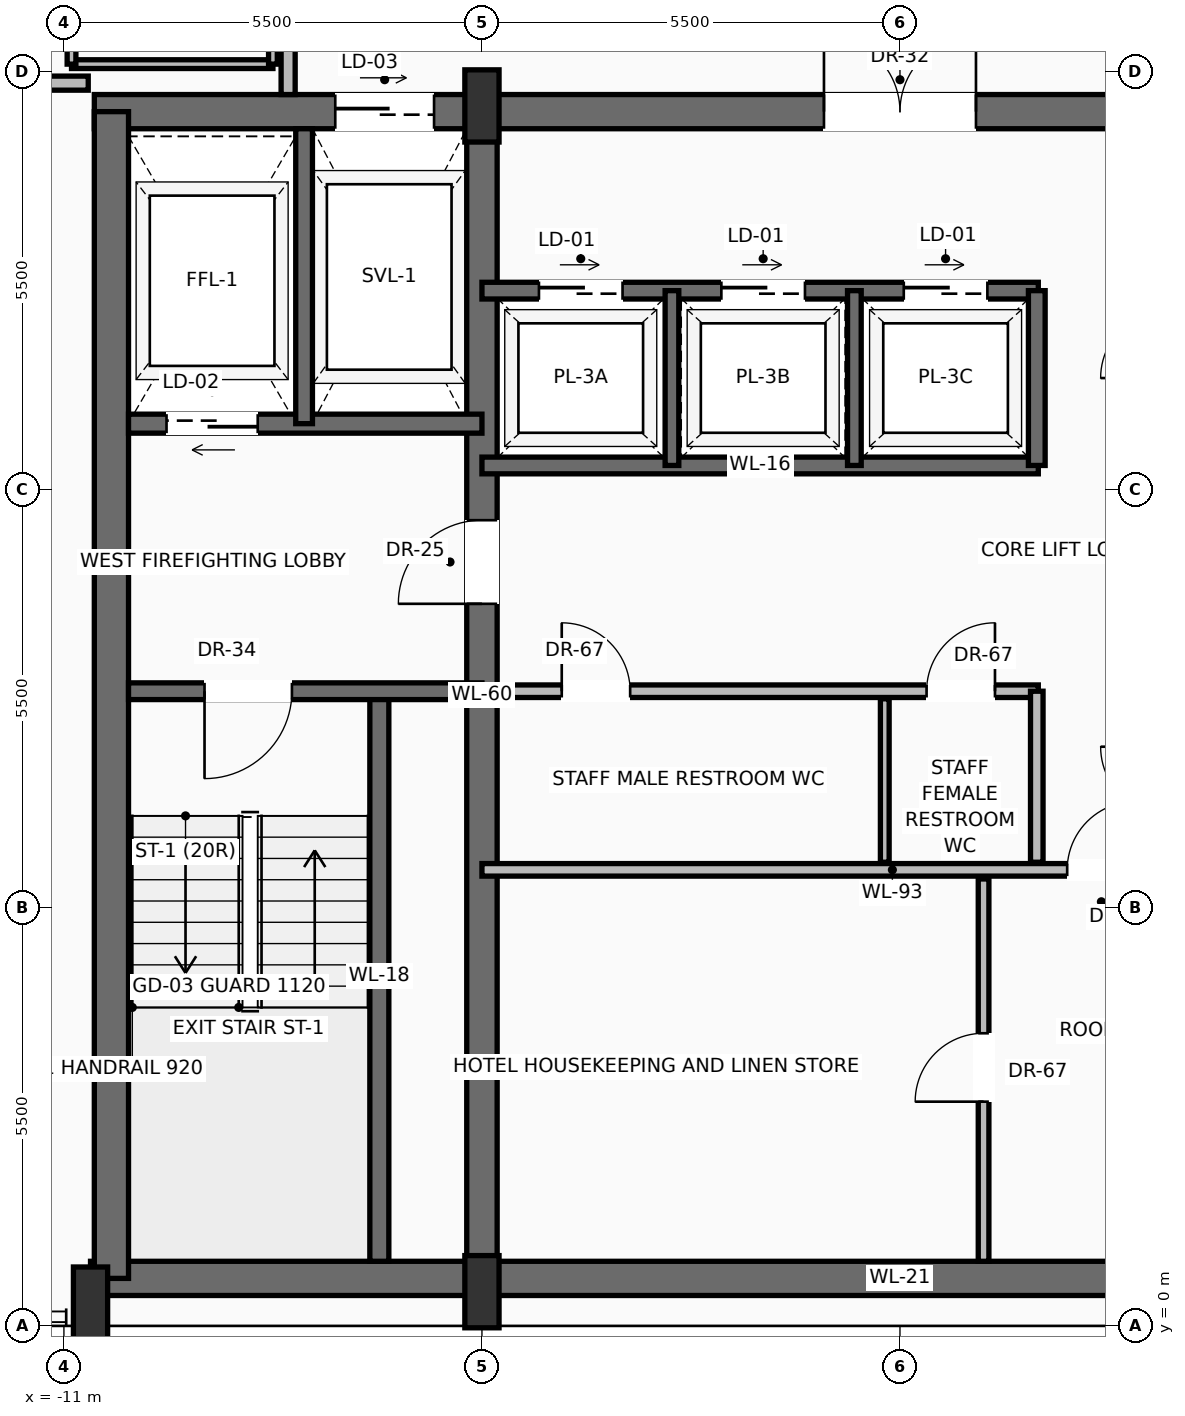
"""IFC4 building model, lengths in metres.
Left out: names, types, materials, properties, quantities, classifications, styles, units other than length and angle.
Written with IfcOpenShell. Run it as: python <this file> out.ifc"""

import sys

from ifc_helpers import new_model, si_unit, direction, frame, frame_2d, origin, origin_2d, place, context, subcontext, project, spatial, rectangle, extrude, source, transform, mapped, element, fill, save


model = new_model("IFC4")
c1 = context("Model", 3, precision=1e-05, world=origin(), true_north=direction((0.0, 1.0)))
c2 = subcontext(c1, "Body", "Model", "MODEL_VIEW")
j1 = project(units=[si_unit("LENGTHUNIT", "METRE"), si_unit("PLANEANGLEUNIT", "RADIAN")], contexts=[c1])
p1 = place(None, origin())
s1 = spatial("IfcSite", under=j1, at=p1, CompositionType="ELEMENT")
p2 = place(p1, origin())
s2 = spatial("IfcBuilding", under=s1, at=p2, CompositionType="ELEMENT")
p3 = place(p2, frame((0.0, 0.0, 279.9)))
s3 = spatial("IfcBuildingStorey", under=s2, at=p3, CompositionType="ELEMENT", Elevation=279.9)
p4 = place(p3, frame((-10.65, 0.625, 0.0), z_axis=(0.0, 0.0, 1.0), x_axis=(1.0, 0.0, 0.0)))
e1 = element("IfcWall", 1, at=p4, inside=s3, PredefinedType="SHEAR", context=c2, shape_type="SweptSolid", body=[
    extrude(rectangle(XDim=21.3, YDim=0.45, at=frame_2d((10.65, 0.0))), origin(), (0.0, 0.0, 1.0), 3.24),
])
p5 = place(p3, frame((-10.6, 15.975, 0.0), z_axis=(0.0, 0.0, 1.0), x_axis=(1.0, 0.0, 0.0)))
e2 = element("IfcWall", 2, at=p5, inside=s3, PredefinedType="SHEAR", context=c2, shape_type="SweptSolid", body=[
    extrude(rectangle(XDim=21.2, YDim=0.45, at=frame_2d((10.6, 0.0))), origin(), (0.0, 0.0, 1.0), 3.24),
])
p6 = place(p5, frame((3.17, 0.0, 0.0)))
e3 = element("IfcOpeningElement", 3, at=p6, cuts=e2, PredefinedType="OPENING", context=c2, shape_type="SweptSolid", body=[
    extrude(rectangle(XDim=1.3, YDim=2.3, at=frame_2d((0.65, 1.15))), frame((0.0, 0.235, 0.0), z_axis=(0.0, -1.0, 0.0), x_axis=(1.0, 0.0, 0.0)), (0.0, 0.0, 1.0), 0.47),
])
p7 = place(p5, frame((9.6, 0.0, 0.0)))
e4 = element("IfcOpeningElement", 4, at=p7, cuts=e2, PredefinedType="OPENING", context=c2, shape_type="SweptSolid", body=[
    extrude(rectangle(XDim=2.0, YDim=2.4, at=frame_2d((1.0, 1.2))), frame((0.0, 0.235, 0.0), z_axis=(0.0, -1.0, 0.0), x_axis=(1.0, 0.0, 0.0)), (0.0, 0.0, 1.0), 0.47),
])
p8 = place(p3, frame((-10.375, 0.625, 0.0), z_axis=(0.0, 0.0, 1.0), x_axis=(0.0, 1.0, 0.0)))
e5 = element("IfcWall", 5, at=p8, inside=s3, PredefinedType="SHEAR", context=c2, shape_type="SweptSolid", body=[
    extrude(rectangle(XDim=15.35, YDim=0.45, at=frame_2d((7.675, 0.0))), origin(), (0.0, 0.0, 1.0), 3.24),
])
p9 = place(p3, frame((-5.5, 0.625, 0.0), z_axis=(0.0, 0.0, 1.0), x_axis=(0.0, 1.0, 0.0)))
e6 = element("IfcWall", 6, at=p9, inside=s3, PredefinedType="SHEAR", context=c2, shape_type="SweptSolid", body=[
    extrude(rectangle(XDim=15.35, YDim=0.4, at=frame_2d((7.675, 0.0))), origin(), (0.0, 0.0, 1.0), 3.24),
])
p10 = place(p9, frame((8.875, 0.0, 0.0)))
e7 = element("IfcOpeningElement", 7, at=p10, cuts=e6, PredefinedType="OPENING", context=c2, shape_type="SweptSolid", body=[
    extrude(rectangle(XDim=1.1, YDim=2.2, at=frame_2d((0.55, 1.1))), frame((0.0, 0.21, 0.0), z_axis=(0.0, -1.0, 0.0), x_axis=(1.0, 0.0, 0.0)), (0.0, 0.0, 1.0), 0.42),
])
m1 = source(origin(), c2, "Body", "SweptSolid", [
    extrude(rectangle(XDim=0.45, YDim=0.95, at=origin_2d()), origin(), (0.0, 0.0, 1.0), 3.45),
])
for number, where, z_axis, x_axis in (
    (8, (-10.65, 0.3, 0.0), (0.0, 0.0, 1.0), (1.0, 0.0, 0.0)),
    (9, (-5.5, 0.45, 0.0), (0.0, 0.0, 1.0), (1.0, 0.0, 0.0)),
    (10, (-5.5, 16.05, 0.0), (0.0, 0.0, 1.0), (1.0, 0.0, 0.0)),
):
    element("IfcColumn", number, at=place(p3, frame(where, z_axis=z_axis, x_axis=x_axis)), inside=s3, PredefinedType="PILASTER", context=c2, shape_type="MappedRepresentation", body=[
        mapped(m1, transform((0.0, 0.0, 0.0), scale=1.0)),
    ])
p11 = place(p3, frame((-18.34, 14.15, 0.0), z_axis=(0.0, 0.0, 1.0), x_axis=(0.499519590366, 0.866302590808, 0.0)))
e11 = element("IfcWall", 11, at=p11, inside=s3, PredefinedType="SOLIDWALL", context=c2, shape_type="SweptSolid", body=[
    extrude(rectangle(XDim=20.144, YDim=0.28, at=frame_2d((10.072, 0.0))), origin(), (0.0, 0.0, 1.0), 2.82),
])
p12 = place(p11, frame((4.834, 0.0, 0.0)))
e12 = element("IfcOpeningElement", 12, at=p12, cuts=e11, PredefinedType="OPENING", context=c2, shape_type="SweptSolid", body=[
    extrude(rectangle(XDim=1.6, YDim=2.35, at=frame_2d((0.8, 1.175))), frame((0.0, 0.15, 0.0), z_axis=(0.0, -1.0, 0.0), x_axis=(1.0, 0.0, 0.0)), (0.0, 0.0, 1.0), 0.3),
])
p13 = place(p11, frame((13.698, 0.0, 0.9)))
e13 = element("IfcOpeningElement", 13, at=p13, cuts=e11, PredefinedType="OPENING", context=c2, shape_type="SweptSolid", body=[
    extrude(rectangle(XDim=1.55, YDim=1.75, at=frame_2d((0.775, 0.875))), frame((0.0, 0.15, 0.0), z_axis=(0.0, -1.0, 0.0), x_axis=(1.0, 0.0, 0.0)), (0.0, 0.0, 1.0), 0.3),
])
p14 = place(p3, frame((-6.85, 0.85, 0.0), z_axis=(0.0, 0.0, 1.0), x_axis=(0.0, 1.0, 0.0)))
e14 = element("IfcWall", 14, at=p14, inside=s3, PredefinedType="SOLIDWALL", context=c2, shape_type="SweptSolid", body=[
    extrude(rectangle(XDim=7.5, YDim=0.25, at=frame_2d((3.75, 0.0))), origin(), (0.0, 0.0, 1.0), 3.24),
])
p15 = place(p3, frame((-5.5, 8.35, 0.0), z_axis=(0.0, 0.0, 1.0), x_axis=(-1.0, 0.0, 0.0)))
e15 = element("IfcWall", 15, at=p15, inside=s3, PredefinedType="SOLIDWALL", context=c2, shape_type="SweptSolid", body=[
    extrude(rectangle(XDim=4.65, YDim=0.22, at=frame_2d((2.325, 0.0))), origin(), (0.0, 0.0, 1.0), 3.24),
])
p16 = place(p15, frame((2.5, 0.0, 0.0)))
e16 = element("IfcOpeningElement", 16, at=p16, cuts=e15, PredefinedType="OPENING", context=c2, shape_type="SweptSolid", body=[
    extrude(rectangle(XDim=1.15, YDim=2.2, at=frame_2d((0.575, 1.1))), frame((0.0, 0.12, 0.0), z_axis=(0.0, -1.0, 0.0), x_axis=(1.0, 0.0, 0.0)), (0.0, 0.0, 1.0), 0.24),
])
p17 = place(p3, frame((-5.5, 11.87, 0.0), z_axis=(0.0, 0.0, 1.0), x_axis=(-1.0, 0.0, 0.0)))
e17 = element("IfcWall", 17, at=p17, inside=s3, PredefinedType="SOLIDWALL", context=c2, shape_type="SweptSolid", body=[
    extrude(rectangle(XDim=4.65, YDim=0.25, at=frame_2d((2.325, 0.0))), origin(), (0.0, 0.0, 1.0), 3.24),
])
p18 = place(p17, frame((2.95, 0.0, 0.0)))
e18 = element("IfcOpeningElement", 18, at=p18, cuts=e17, PredefinedType="OPENING", context=c2, shape_type="SweptSolid", body=[
    extrude(rectangle(XDim=1.2, YDim=2.25, at=frame_2d((0.6, 1.125))), frame((0.0, 0.135, 0.0), z_axis=(0.0, -1.0, 0.0), x_axis=(1.0, 0.0, 0.0)), (0.0, 0.0, 1.0), 0.27),
])
p19 = place(p3, frame((-7.84, 11.87, 0.0), z_axis=(0.0, 0.0, 1.0), x_axis=(0.0, 1.0, 0.0)))
e19 = element("IfcWall", 19, at=p19, inside=s3, PredefinedType="SOLIDWALL", context=c2, shape_type="SweptSolid", body=[
    extrude(rectangle(XDim=3.88, YDim=0.22, at=frame_2d((1.94, 0.0))), origin(), (0.0, 0.0, 1.0), 3.24),
])
p20 = place(p3, frame((-5.5, 6.0, 0.0), z_axis=(0.0, 0.0, 1.0), x_axis=(1.0, 0.0, 0.0)))
e20 = element("IfcWall", 20, at=p20, inside=s3, PredefinedType="PARTITIONING", context=c2, shape_type="SweptSolid", body=[
    extrude(rectangle(XDim=10.8, YDim=0.165, at=frame_2d((5.4, 0.0))), origin(), (0.0, 0.0, 1.0), 3.232),
])
p21 = place(p20, frame((7.7, 0.0, 0.0)))
e21 = element("IfcOpeningElement", 21, at=p21, cuts=e20, PredefinedType="OPENING", context=c2, shape_type="SweptSolid", body=[
    extrude(rectangle(XDim=0.9, YDim=2.1, at=frame_2d((0.45, 1.05))), frame((0.0, 0.093, 0.0), z_axis=(0.0, -1.0, 0.0), x_axis=(1.0, 0.0, 0.0)), (0.0, 0.0, 1.0), 0.185),
])
p22 = place(p3, frame((1.1, 0.85, 0.0), z_axis=(0.0, 0.0, 1.0), x_axis=(0.0, 1.0, 0.0)))
e22 = element("IfcWall", 22, at=p22, inside=s3, PredefinedType="PARTITIONING", context=c2, shape_type="SweptSolid", body=[
    extrude(rectangle(XDim=5.03, YDim=0.14, at=frame_2d((2.515, 0.0))), origin(), (0.0, 0.0, 1.0), 3.232),
])
p23 = place(p22, frame((2.1, 0.0, 0.0)))
e23 = element("IfcOpeningElement", 23, at=p23, cuts=e22, PredefinedType="OPENING", context=c2, shape_type="SweptSolid", body=[
    extrude(rectangle(XDim=0.9, YDim=2.1, at=frame_2d((0.45, 1.05))), frame((0.0, 0.08, 0.0), z_axis=(0.0, -1.0, 0.0), x_axis=(1.0, 0.0, 0.0)), (0.0, 0.0, 1.0), 0.16),
])
p24 = place(p3, frame((-5.3, 8.35, 0.0), z_axis=(0.0, 0.0, 1.0), x_axis=(1.0, 0.0, 0.0)))
e24 = element("IfcWall", 24, at=p24, inside=s3, PredefinedType="PARTITIONING", context=c2, shape_type="SweptSolid", body=[
    extrude(rectangle(XDim=7.12, YDim=0.165, at=frame_2d((3.56, 0.0))), origin(), (0.0, 0.0, 1.0), 3.232),
])
p25 = place(p24, frame((0.85, 0.0, 0.0)))
e25 = element("IfcOpeningElement", 25, at=p25, cuts=e24, PredefinedType="OPENING", context=c2, shape_type="SweptSolid", body=[
    extrude(rectangle(XDim=0.9, YDim=2.1, at=frame_2d((0.45, 1.05))), frame((0.0, 0.093, 0.0), z_axis=(0.0, -1.0, 0.0), x_axis=(1.0, 0.0, 0.0)), (0.0, 0.0, 1.0), 0.185),
])
p26 = place(p24, frame((5.65, 0.0, 0.0)))
e26 = element("IfcOpeningElement", 26, at=p26, cuts=e24, PredefinedType="OPENING", context=c2, shape_type="SweptSolid", body=[
    extrude(rectangle(XDim=0.9, YDim=2.1, at=frame_2d((0.45, 1.05))), frame((0.0, 0.093, 0.0), z_axis=(0.0, -1.0, 0.0), x_axis=(1.0, 0.0, 0.0)), (0.0, 0.0, 1.0), 0.185),
])
p27 = place(p3, frame((1.8, 6.1, 0.0), z_axis=(0.0, 0.0, 1.0), x_axis=(0.0, 1.0, 0.0)))
e27 = element("IfcWall", 27, at=p27, inside=s3, PredefinedType="PARTITIONING", context=c2, shape_type="SweptSolid", body=[
    extrude(rectangle(XDim=2.25, YDim=0.165, at=frame_2d((1.125, 0.0))), origin(), (0.0, 0.0, 1.0), 3.232),
])
p28 = place(p3, frame((-0.2, 6.1, 0.0), z_axis=(0.0, 0.0, 1.0), x_axis=(0.0, 1.0, 0.0)))
e28 = element("IfcWall", 28, at=p28, inside=s3, PredefinedType="PARTITIONING", context=c2, shape_type="SweptSolid", body=[
    extrude(rectangle(XDim=2.15, YDim=0.115, at=frame_2d((1.075, 0.0))), origin(), (0.0, 0.0, 1.0), 3.232),
])
p29 = place(p3, frame((-5.5, 11.32, 0.0), z_axis=(0.0, 0.0, 1.0), x_axis=(1.0, 0.0, 0.0)))
e29 = element("IfcWall", 29, at=p29, inside=s3, PredefinedType="SOLIDWALL", context=c2, shape_type="SweptSolid", body=[
    extrude(rectangle(XDim=7.32, YDim=0.22, at=frame_2d((3.66, 0.0))), origin(), (0.0, 0.0, 1.0), 3.24),
])
p30 = place(p3, frame((-5.5, 13.62, 0.0), z_axis=(0.0, 0.0, 1.0), x_axis=(1.0, 0.0, 0.0)))
e30 = element("IfcWall", 30, at=p30, inside=s3, PredefinedType="SOLIDWALL", context=c2, shape_type="SweptSolid", body=[
    extrude(rectangle(XDim=7.32, YDim=0.22, at=frame_2d((3.66, 0.0))), origin(), (0.0, 0.0, 1.0), 3.24),
])
p31 = place(p30, frame((0.75, 0.0, 0.0)))
e31 = element("IfcOpeningElement", 31, at=p31, cuts=e30, PredefinedType="OPENING", context=c2, shape_type="SweptSolid", body=[
    extrude(rectangle(XDim=1.1, YDim=2.2, at=frame_2d((0.55, 1.1))), frame((0.0, 0.12, 0.0), z_axis=(0.0, -1.0, 0.0), x_axis=(1.0, 0.0, 0.0)), (0.0, 0.0, 1.0), 0.24),
])
p32 = place(p30, frame((3.15, 0.0, 0.0)))
e32 = element("IfcOpeningElement", 32, at=p32, cuts=e30, PredefinedType="OPENING", context=c2, shape_type="SweptSolid", body=[
    extrude(rectangle(XDim=1.1, YDim=2.2, at=frame_2d((0.55, 1.1))), frame((0.0, 0.12, 0.0), z_axis=(0.0, -1.0, 0.0), x_axis=(1.0, 0.0, 0.0)), (0.0, 0.0, 1.0), 0.24),
])
p33 = place(p30, frame((5.55, 0.0, 0.0)))
e33 = element("IfcOpeningElement", 33, at=p33, cuts=e30, PredefinedType="OPENING", context=c2, shape_type="SweptSolid", body=[
    extrude(rectangle(XDim=1.1, YDim=2.2, at=frame_2d((0.55, 1.1))), frame((0.0, 0.12, 0.0), z_axis=(0.0, -1.0, 0.0), x_axis=(1.0, 0.0, 0.0)), (0.0, 0.0, 1.0), 0.24),
])
p34 = place(p3, frame((1.8, 11.32, 0.0), z_axis=(0.0, 0.0, 1.0), x_axis=(0.0, 1.0, 0.0)))
e34 = element("IfcWall", 34, at=p34, inside=s3, PredefinedType="SOLIDWALL", context=c2, shape_type="SweptSolid", body=[
    extrude(rectangle(XDim=2.3, YDim=0.22, at=frame_2d((1.15, 0.0))), origin(), (0.0, 0.0, 1.0), 3.24),
])
for number, where, z_axis, x_axis in (
    (35, (-3.0, 11.32, 0.0), (0.0, 0.0, 1.0), (0.0, 1.0, 0.0)),
    (36, (-0.6, 11.32, 0.0), (0.0, 0.0, 1.0), (0.0, 1.0, 0.0)),
):
    element("IfcWall", number, at=place(p3, frame(where, z_axis=z_axis, x_axis=x_axis)), inside=s3, PredefinedType="SOLIDWALL", context=c2, shape_type="SweptSolid", body=[
        extrude(rectangle(XDim=2.3, YDim=0.18, at=frame_2d((1.15, 0.0))), origin(), (0.0, 0.0, 1.0), 3.24),
    ])
p35 = place(p3, frame((-8.05, 16.2, 0.0), z_axis=(0.0, 0.0, 1.0), x_axis=(0.0, 1.0, 0.0)))
e37 = element("IfcWall", 37, at=p35, inside=s3, PredefinedType="PARTITIONING", context=c2, shape_type="SweptSolid", body=[
    extrude(rectangle(XDim=12.4, YDim=0.185, at=frame_2d((6.2, 0.0))), origin(), (0.0, 0.0, 1.0), 3.232),
])
p36 = place(p35, frame((3.218, 0.0, 0.0)))
e38 = element("IfcOpeningElement", 38, at=p36, cuts=e37, PredefinedType="OPENING", context=c2, shape_type="SweptSolid", body=[
    extrude(rectangle(XDim=1.05, YDim=2.25, at=frame_2d((0.525, 1.125))), frame((0.0, 0.103, 0.0), z_axis=(0.0, -1.0, 0.0), x_axis=(1.0, 0.0, 0.0)), (0.0, 0.0, 1.0), 0.205),
])
p37 = place(p35, frame((8.936, 0.0, 0.0)))
e39 = element("IfcOpeningElement", 39, at=p37, cuts=e37, PredefinedType="OPENING", context=c2, shape_type="SweptSolid", body=[
    extrude(rectangle(XDim=1.05, YDim=2.25, at=frame_2d((0.525, 1.125))), frame((0.0, 0.103, 0.0), z_axis=(0.0, -1.0, 0.0), x_axis=(1.0, 0.0, 0.0)), (0.0, 0.0, 1.0), 0.205),
])
p38 = place(p3, frame((-17.222, 16.35, 0.0), z_axis=(0.0, 0.0, 1.0), x_axis=(1.0, 0.0, 0.0)))
e40 = element("IfcWall", 40, at=p38, inside=s3, PredefinedType="PARTITIONING", context=c2, shape_type="SweptSolid", body=[
    extrude(rectangle(XDim=6.542, YDim=0.185, at=frame_2d((3.271, 0.0))), origin(), (0.0, 0.0, 1.0), 3.232),
])
p39 = place(p38, frame((3.625, 0.0, 0.0)))
e41 = element("IfcOpeningElement", 41, at=p39, cuts=e40, PredefinedType="OPENING", context=c2, shape_type="SweptSolid", body=[
    extrude(rectangle(XDim=1.05, YDim=2.25, at=frame_2d((0.525, 1.125))), frame((0.0, 0.103, 0.0), z_axis=(0.0, -1.0, 0.0), x_axis=(1.0, 0.0, 0.0)), (0.0, 0.0, 1.0), 0.205),
])
p40 = place(p3, frame((-10.9, 16.6, 0.0), z_axis=(0.0, 0.0, 1.0), x_axis=(1.0, 0.0, 0.0)))
e42 = element("IfcWall", 42, at=p40, inside=s3, PredefinedType="PARTITIONING", context=c2, shape_type="SweptSolid", body=[
    extrude(rectangle(XDim=2.65, YDim=0.115, at=frame_2d((1.325, 0.0))), origin(), (0.0, 0.0, 1.0), 3.232),
])
p41 = place(p3, frame((-10.9, 16.6, 0.0), z_axis=(0.0, 0.0, 1.0), x_axis=(0.0, 1.0, 0.0)))
e43 = element("IfcWall", 43, at=p41, inside=s3, PredefinedType="PARTITIONING", context=c2, shape_type="SweptSolid", body=[
    extrude(rectangle(XDim=2.4, YDim=0.115, at=frame_2d((1.2, 0.0))), origin(), (0.0, 0.0, 1.0), 3.232),
])
p42 = place(p41, frame((0.75, 0.0, 0.0)))
e44 = element("IfcOpeningElement", 44, at=p42, cuts=e43, PredefinedType="OPENING", context=c2, shape_type="SweptSolid", body=[
    extrude(rectangle(XDim=0.9, YDim=2.15, at=frame_2d((0.45, 1.075))), frame((0.0, 0.067, 0.0), z_axis=(0.0, -1.0, 0.0), x_axis=(1.0, 0.0, 0.0)), (0.0, 0.0, 1.0), 0.135),
])
p43 = place(p3, frame((-8.25, 16.6, 0.0), z_axis=(0.0, 0.0, 1.0), x_axis=(0.0, 1.0, 0.0)))
e45 = element("IfcWall", 45, at=p43, inside=s3, PredefinedType="PARTITIONING", context=c2, shape_type="SweptSolid", body=[
    extrude(rectangle(XDim=2.4, YDim=0.115, at=frame_2d((1.2, 0.0))), origin(), (0.0, 0.0, 1.0), 3.232),
])
m2 = source(origin(), c2, "Body", "SweptSolid", [
    extrude(rectangle(XDim=1.15, YDim=2.2, at=frame_2d((0.575, 1.1))), frame((0.0, 0.025, 0.0), z_axis=(0.0, -1.0, 0.0), x_axis=(1.0, 0.0, 0.0)), (0.0, 0.0, 1.0), 0.05),
])
p44 = place(p16, origin())
e46 = element("IfcDoor", 46, at=p44, inside=s3, OperationType="SINGLE_SWING_RIGHT", PredefinedType="DOOR", context=c2, shape_type="MappedRepresentation", body=[
    mapped(m2, transform((0.0, 0.0, 0.0), scale=1.0)),
])
fill(e16, e46)
m3 = source(origin(), c2, "Body", "SweptSolid", [
    extrude(rectangle(XDim=1.1, YDim=2.2, at=frame_2d((0.55, 1.1))), frame((0.0, 0.025, 0.0), z_axis=(0.0, -1.0, 0.0), x_axis=(1.0, 0.0, 0.0)), (0.0, 0.0, 1.0), 0.05),
])
p45 = place(p10, origin())
e47 = element("IfcDoor", 47, at=p45, inside=s3, OperationType="SINGLE_SWING_LEFT", PredefinedType="DOOR", context=c2, shape_type="MappedRepresentation", body=[
    mapped(m3, transform((0.0, 0.0, 0.0), scale=1.0)),
])
fill(e7, e47)
m4 = source(origin(), c2, "Body", "SweptSolid", [
    extrude(rectangle(XDim=1.2, YDim=2.25, at=frame_2d((0.6, 1.125))), frame((0.0, 0.025, 0.0), z_axis=(0.0, -1.0, 0.0), x_axis=(1.0, 0.0, 0.0)), (0.0, 0.0, 1.0), 0.05),
])
p46 = place(p18, origin())
e48 = element("IfcDoor", 48, at=p46, inside=s3, OperationType="SLIDING_TO_LEFT", PredefinedType="DOOR", context=c2, shape_type="MappedRepresentation", body=[
    mapped(m4, transform((0.0, 0.0, 0.0), scale=1.0)),
])
fill(e18, e48)
m5 = source(origin(), c2, "Body", "SweptSolid", [
    extrude(rectangle(XDim=1.3, YDim=2.3, at=frame_2d((0.65, 1.15))), frame((0.0, 0.025, 0.0), z_axis=(0.0, -1.0, 0.0), x_axis=(1.0, 0.0, 0.0)), (0.0, 0.0, 1.0), 0.05),
])
p47 = place(p6, origin())
e49 = element("IfcDoor", 49, at=p47, inside=s3, OperationType="SLIDING_TO_RIGHT", PredefinedType="DOOR", context=c2, shape_type="MappedRepresentation", body=[
    mapped(m5, transform((0.0, 0.0, 0.0), scale=1.0)),
])
fill(e3, e49)
m6 = source(origin(), c2, "Body", "SweptSolid", [
    extrude(rectangle(XDim=2.0, YDim=2.4, at=frame_2d((1.0, 1.2))), frame((0.0, 0.025, 0.0), z_axis=(0.0, -1.0, 0.0), x_axis=(1.0, 0.0, 0.0)), (0.0, 0.0, 1.0), 0.05),
])
p48 = place(p7, origin())
e50 = element("IfcDoor", 50, at=p48, inside=s3, OperationType="DOUBLE_DOOR_SINGLE_SWING", PredefinedType="DOOR", context=c2, shape_type="MappedRepresentation", body=[
    mapped(m6, transform((0.0, 0.0, 0.0), scale=1.0)),
])
fill(e4, e50)
m7 = source(origin(), c2, "Body", "SweptSolid", [
    extrude(rectangle(XDim=0.9, YDim=2.1, at=frame_2d((0.45, 1.05))), frame((0.0, 0.025, 0.0), z_axis=(0.0, -1.0, 0.0), x_axis=(1.0, 0.0, 0.0)), (0.0, 0.0, 1.0), 0.05),
])
p49 = place(p21, origin())
e51 = element("IfcDoor", 51, at=p49, inside=s3, OperationType="SINGLE_SWING_RIGHT", PredefinedType="DOOR", context=c2, shape_type="MappedRepresentation", body=[
    mapped(m7, transform((0.0, 0.0, 0.0), scale=1.0)),
])
fill(e21, e51)
p50 = place(p23, origin())
e52 = element("IfcDoor", 52, at=p50, inside=s3, OperationType="SINGLE_SWING_LEFT", PredefinedType="DOOR", context=c2, shape_type="MappedRepresentation", body=[
    mapped(m7, transform((0.0, 0.0, 0.0), scale=1.0)),
])
fill(e23, e52)
p51 = place(p25, origin())
e53 = element("IfcDoor", 53, at=p51, inside=s3, OperationType="SINGLE_SWING_LEFT", PredefinedType="DOOR", context=c2, shape_type="MappedRepresentation", body=[
    mapped(m7, transform((0.0, 0.0, 0.0), scale=1.0)),
])
fill(e25, e53)
p52 = place(p26, origin())
e54 = element("IfcDoor", 54, at=p52, inside=s3, OperationType="SINGLE_SWING_RIGHT", PredefinedType="DOOR", context=c2, shape_type="MappedRepresentation", body=[
    mapped(m7, transform((0.0, 0.0, 0.0), scale=1.0)),
])
fill(e26, e54)
m8 = source(origin(), c2, "Body", "SweptSolid", [
    extrude(rectangle(XDim=1.1, YDim=2.2, at=frame_2d((0.55, 1.1))), frame((0.0, 0.025, 0.0), z_axis=(0.0, -1.0, 0.0), x_axis=(1.0, 0.0, 0.0)), (0.0, 0.0, 1.0), 0.05),
])
p53 = place(p31, origin())
e55 = element("IfcDoor", 55, at=p53, inside=s3, OperationType="SLIDING_TO_RIGHT", PredefinedType="DOOR", context=c2, shape_type="MappedRepresentation", body=[
    mapped(m8, transform((0.0, 0.0, 0.0), scale=1.0)),
])
fill(e31, e55)
p54 = place(p32, origin())
e56 = element("IfcDoor", 56, at=p54, inside=s3, OperationType="SLIDING_TO_RIGHT", PredefinedType="DOOR", context=c2, shape_type="MappedRepresentation", body=[
    mapped(m8, transform((0.0, 0.0, 0.0), scale=1.0)),
])
fill(e32, e56)
p55 = place(p33, origin())
e57 = element("IfcDoor", 57, at=p55, inside=s3, OperationType="SLIDING_TO_RIGHT", PredefinedType="DOOR", context=c2, shape_type="MappedRepresentation", body=[
    mapped(m8, transform((0.0, 0.0, 0.0), scale=1.0)),
])
fill(e33, e57)
save(model, sys.argv[1])
